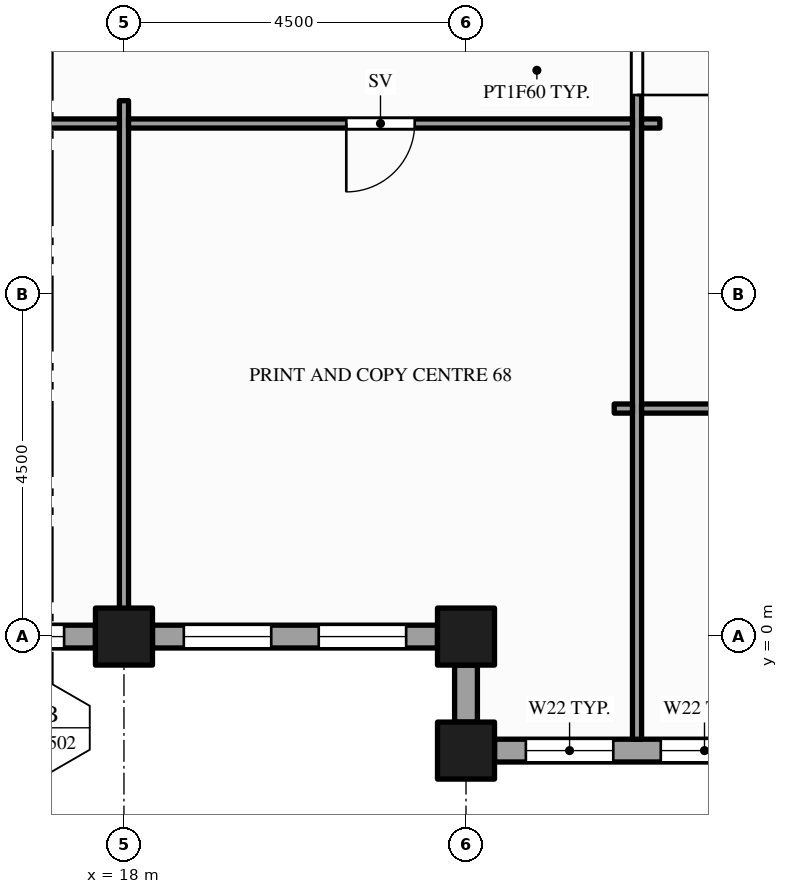
"""IFC4 building model, lengths in metres.
Left out: names, types, materials, properties, quantities, classifications, styles, units other than length and angle.
Written with IfcOpenShell. Run it as: python <this file> out.ifc"""

import sys

from ifc_helpers import new_model, si_unit, direction, frame, frame_2d, origin, origin_2d, place, context, subcontext, project, spatial, rectangle, hollow_rectangle, extrude, element, fill, save


model = new_model("IFC4")
c1 = context("Model", 3, precision=1e-05, world=origin(), true_north=direction((0.0, 1.0)))
c2 = subcontext(c1, "Body", "Model", "MODEL_VIEW")
j1 = project(units=[si_unit("LENGTHUNIT", "METRE"), si_unit("PLANEANGLEUNIT", "RADIAN")], contexts=[c1])
p1 = place(None, origin())
s1 = spatial("IfcSite", under=j1, at=p1, CompositionType="ELEMENT")
p2 = place(p1, origin())
s2 = spatial("IfcBuilding", under=s1, at=p2, CompositionType="ELEMENT")
p3 = place(p2, frame((0.0, 0.0, 223.0)))
s3 = spatial("IfcBuildingStorey", under=s2, at=p3, CompositionType="ELEMENT", Elevation=223.0)
for number, where, z_axis, x_axis in (
    (1, (18.0, 0.0, -0.15), (0.0, 0.0, 1.0), (1.0, 0.0, 0.0)),
    (2, (22.5, -1.5, -0.15), (0.0, 0.0, 1.0), (1.0, 0.0, 0.0)),
    (3, (22.5, 0.0, -0.15), (0.0, 0.0, 1.0), (1.0, 0.0, 0.0)),
):
    element("IfcColumn", number, at=place(p3, frame(where, z_axis=z_axis, x_axis=x_axis)), inside=s3, PredefinedType="COLUMN", context=c2, shape_type="SweptSolid", body=[
        extrude(hollow_rectangle(XDim=0.75, YDim=0.75, WallThickness=0.036, at=origin_2d()), origin(), (0.0, 0.0, 1.0), 4.0),
    ])
p4 = place(p3, frame((22.875, -1.5, 0.0), z_axis=(0.0, 0.0, 1.0), x_axis=(1.0, 0.0, 0.0)))
e4 = element("IfcWall", 4, at=p4, inside=s3, PredefinedType="STANDARD", context=c2, shape_type="SweptSolid", body=[
    extrude(rectangle(XDim=3.75, YDim=0.3, at=frame_2d((1.875, 0.0))), origin(), (0.0, 0.0, 1.0), 2.76),
])
p5 = place(p4, frame((0.413, 0.0, 0.9)))
e5 = element("IfcOpeningElement", 5, at=p5, cuts=e4, PredefinedType="OPENING", context=c2, shape_type="SweptSolid", body=[
    extrude(rectangle(XDim=1.15, YDim=1.5, at=frame_2d((0.575, 0.75))), frame((0.0, 0.16, 0.0), z_axis=(0.0, -1.0, 0.0), x_axis=(1.0, 0.0, 0.0)), (0.0, 0.0, 1.0), 0.32),
])
p6 = place(p4, frame((2.188, 0.0, 0.9)))
e6 = element("IfcOpeningElement", 6, at=p6, cuts=e4, PredefinedType="OPENING", context=c2, shape_type="SweptSolid", body=[
    extrude(rectangle(XDim=1.15, YDim=1.5, at=frame_2d((0.575, 0.75))), frame((0.0, 0.16, 0.0), z_axis=(0.0, -1.0, 0.0), x_axis=(1.0, 0.0, 0.0)), (0.0, 0.0, 1.0), 0.32),
])
p7 = place(p3, frame((13.875, 0.0, 0.0), z_axis=(0.0, 0.0, 1.0), x_axis=(1.0, 0.0, 0.0)))
e7 = element("IfcWall", 7, at=p7, inside=s3, PredefinedType="STANDARD", context=c2, shape_type="SweptSolid", body=[
    extrude(rectangle(XDim=3.75, YDim=0.3, at=frame_2d((1.875, 0.0))), origin(), (0.0, 0.0, 1.0), 2.87),
])
p8 = place(p7, frame((0.413, 0.0, 0.9)))
e8 = element("IfcOpeningElement", 8, at=p8, cuts=e7, PredefinedType="OPENING", context=c2, shape_type="SweptSolid", body=[
    extrude(rectangle(XDim=1.15, YDim=1.75, at=frame_2d((0.575, 0.875))), frame((0.0, 0.16, 0.0), z_axis=(0.0, -1.0, 0.0), x_axis=(1.0, 0.0, 0.0)), (0.0, 0.0, 1.0), 0.32),
])
p9 = place(p7, frame((2.188, 0.0, 0.9)))
e9 = element("IfcOpeningElement", 9, at=p9, cuts=e7, PredefinedType="OPENING", context=c2, shape_type="SweptSolid", body=[
    extrude(rectangle(XDim=1.15, YDim=1.75, at=frame_2d((0.575, 0.875))), frame((0.0, 0.16, 0.0), z_axis=(0.0, -1.0, 0.0), x_axis=(1.0, 0.0, 0.0)), (0.0, 0.0, 1.0), 0.32),
])
p10 = place(p3, frame((18.375, 0.0, 0.0), z_axis=(0.0, 0.0, 1.0), x_axis=(1.0, 0.0, 0.0)))
e10 = element("IfcWall", 10, at=p10, inside=s3, PredefinedType="STANDARD", context=c2, shape_type="SweptSolid", body=[
    extrude(rectangle(XDim=3.75, YDim=0.3, at=frame_2d((1.875, 0.0))), origin(), (0.0, 0.0, 1.0), 2.87),
])
p11 = place(p10, frame((0.413, 0.0, 0.9)))
e11 = element("IfcOpeningElement", 11, at=p11, cuts=e10, PredefinedType="OPENING", context=c2, shape_type="SweptSolid", body=[
    extrude(rectangle(XDim=1.15, YDim=1.75, at=frame_2d((0.575, 0.875))), frame((0.0, 0.16, 0.0), z_axis=(0.0, -1.0, 0.0), x_axis=(1.0, 0.0, 0.0)), (0.0, 0.0, 1.0), 0.32),
])
p12 = place(p10, frame((2.188, 0.0, 0.9)))
e12 = element("IfcOpeningElement", 12, at=p12, cuts=e10, PredefinedType="OPENING", context=c2, shape_type="SweptSolid", body=[
    extrude(rectangle(XDim=1.15, YDim=1.75, at=frame_2d((0.575, 0.875))), frame((0.0, 0.16, 0.0), z_axis=(0.0, -1.0, 0.0), x_axis=(1.0, 0.0, 0.0)), (0.0, 0.0, 1.0), 0.32),
])
p13 = place(p3, frame((22.5, -0.375, 0.0), z_axis=(0.0, 0.0, 1.0), x_axis=(0.0, -1.0, 0.0)))
e13 = element("IfcWall", 13, at=p13, inside=s3, PredefinedType="STANDARD", context=c2, shape_type="SweptSolid", body=[
    extrude(rectangle(XDim=0.75, YDim=0.3, at=frame_2d((0.375, 0.0))), origin(), (0.0, 0.0, 1.0), 3.157),
])
p14 = place(p3, frame((18.0, 0.15, 0.0), z_axis=(0.0, 0.0, 1.0), x_axis=(0.0, 1.0, 0.0)))
e14 = element("IfcWall", 14, at=p14, inside=s3, PredefinedType="PARTITIONING", context=c2, shape_type="SweptSolid", body=[
    extrude(rectangle(XDim=6.9, YDim=0.12, at=frame_2d((3.45, 0.0))), origin(), (0.0, 0.0, 1.0), 2.87),
])
p15 = place(p3, frame((24.75, -1.35, 0.0), z_axis=(0.0, 0.0, 1.0), x_axis=(0.0, 1.0, 0.0)))
e15 = element("IfcWall", 15, at=p15, inside=s3, PredefinedType="PARTITIONING", context=c2, shape_type="SweptSolid", body=[
    extrude(rectangle(XDim=24.101, YDim=0.12, at=frame_2d((12.05, 0.0))), origin(), (0.0, 0.0, 1.0), 2.76),
])
p16 = place(p15, frame((8.475, 0.0, 0.0)))
e16 = element("IfcOpeningElement", 16, at=p16, cuts=e15, PredefinedType="OPENING", context=c2, shape_type="SweptSolid", body=[
    extrude(rectangle(XDim=1.5, YDim=2.1, at=frame_2d((0.75, 1.05))), frame((0.0, 0.07, 0.0), z_axis=(0.0, -1.0, 0.0), x_axis=(1.0, 0.0, 0.0)), (0.0, 0.0, 1.0), 0.14),
])
p17 = place(p15, frame((13.5, 0.0, 0.0)))
e17 = element("IfcOpeningElement", 17, at=p17, cuts=e15, PredefinedType="OPENING", context=c2, shape_type="SweptSolid", body=[
    extrude(rectangle(XDim=1.2, YDim=2.1, at=frame_2d((0.6, 1.05))), frame((0.0, 0.07, 0.0), z_axis=(0.0, -1.0, 0.0), x_axis=(1.0, 0.0, 0.0)), (0.0, 0.0, 1.0), 0.14),
])
p18 = place(p3, frame((24.45, 3.0, 0.0), z_axis=(0.0, 0.0, 1.0), x_axis=(1.0, 0.0, 0.0)))
e18 = element("IfcWall", 18, at=p18, inside=s3, PredefinedType="PARTITIONING", context=c2, shape_type="SweptSolid", body=[
    extrude(rectangle(XDim=0.24, YDim=0.12, at=frame_2d((0.12, 0.0))), origin(), (0.0, 0.0, 1.0), 2.76),
])
p19 = place(p3, frame((24.81, 3.0, 0.0), z_axis=(0.0, 0.0, 1.0), x_axis=(1.0, 0.0, 0.0)))
e19 = element("IfcWall", 19, at=p19, inside=s3, PredefinedType="PARTITIONING", context=c2, shape_type="SweptSolid", body=[
    extrude(rectangle(XDim=2.13, YDim=0.12, at=frame_2d((1.065, 0.0))), origin(), (0.0, 0.0, 1.0), 2.76),
])
p20 = place(p3, frame((11.31, 6.75, 0.0), z_axis=(0.0, 0.0, 1.0), x_axis=(1.0, 0.0, 0.0)))
e20 = element("IfcWall", 20, at=p20, inside=s3, PredefinedType="PARTITIONING", context=c2, shape_type="SweptSolid", body=[
    extrude(rectangle(XDim=6.63, YDim=0.12, at=frame_2d((3.315, 0.0))), origin(), (0.0, 0.0, 1.0), 2.87),
])
p21 = place(p20, frame((2.815, 0.0, 0.0)))
e21 = element("IfcOpeningElement", 21, at=p21, cuts=e20, PredefinedType="OPENING", context=c2, shape_type="SweptSolid", body=[
    extrude(rectangle(XDim=1.0, YDim=2.1, at=frame_2d((0.5, 1.05))), frame((0.0, 0.07, 0.0), z_axis=(0.0, -1.0, 0.0), x_axis=(1.0, 0.0, 0.0)), (0.0, 0.0, 1.0), 0.14),
])
p22 = place(p3, frame((18.06, 6.75, 0.0), z_axis=(0.0, 0.0, 1.0), x_axis=(1.0, 0.0, 0.0)))
e22 = element("IfcWall", 22, at=p22, inside=s3, PredefinedType="PARTITIONING", context=c2, shape_type="SweptSolid", body=[
    extrude(rectangle(XDim=6.63, YDim=0.12, at=frame_2d((3.315, 0.0))), origin(), (0.0, 0.0, 1.0), 2.76),
])
p23 = place(p22, frame((2.865, 0.0, 0.0)))
e23 = element("IfcOpeningElement", 23, at=p23, cuts=e22, PredefinedType="OPENING", context=c2, shape_type="SweptSolid", body=[
    extrude(rectangle(XDim=0.9, YDim=2.1, at=frame_2d((0.45, 1.05))), frame((0.0, 0.07, 0.0), z_axis=(0.0, -1.0, 0.0), x_axis=(1.0, 0.0, 0.0)), (0.0, 0.0, 1.0), 0.14),
])
p24 = place(p3, frame((24.81, 6.75, 0.0), z_axis=(0.0, 0.0, 1.0), x_axis=(1.0, 0.0, 0.0)))
e24 = element("IfcWall", 24, at=p24, inside=s3, PredefinedType="PARTITIONING", context=c2, shape_type="SweptSolid", body=[
    extrude(rectangle(XDim=0.24, YDim=0.12, at=frame_2d((0.12, 0.0))), origin(), (0.0, 0.0, 1.0), 2.76),
])
p25 = place(p5, origin())
e25 = element("IfcWindow", 25, at=p25, inside=s3, PartitioningType="SINGLE_PANEL", PredefinedType="WINDOW", context=c2, shape_type="SweptSolid", body=[
    extrude(rectangle(XDim=1.15, YDim=1.5, at=frame_2d((0.575, 0.75))), frame((0.0, 0.03, 0.0), z_axis=(0.0, -1.0, 0.0), x_axis=(1.0, 0.0, 0.0)), (0.0, 0.0, 1.0), 0.06),
])
fill(e5, e25)
p26 = place(p6, origin())
e26 = element("IfcWindow", 26, at=p26, inside=s3, PartitioningType="SINGLE_PANEL", PredefinedType="WINDOW", context=c2, shape_type="SweptSolid", body=[
    extrude(rectangle(XDim=1.15, YDim=1.5, at=frame_2d((0.575, 0.75))), frame((0.0, 0.03, 0.0), z_axis=(0.0, -1.0, 0.0), x_axis=(1.0, 0.0, 0.0)), (0.0, 0.0, 1.0), 0.06),
])
fill(e6, e26)
p27 = place(p9, origin())
e27 = element("IfcWindow", 27, at=p27, inside=s3, PartitioningType="SINGLE_PANEL", PredefinedType="WINDOW", context=c2, shape_type="SweptSolid", body=[
    extrude(rectangle(XDim=1.15, YDim=1.75, at=frame_2d((0.575, 0.875))), frame((0.0, 0.03, 0.0), z_axis=(0.0, -1.0, 0.0), x_axis=(1.0, 0.0, 0.0)), (0.0, 0.0, 1.0), 0.06),
])
fill(e9, e27)
p28 = place(p11, origin())
e28 = element("IfcWindow", 28, at=p28, inside=s3, PartitioningType="SINGLE_PANEL", PredefinedType="WINDOW", context=c2, shape_type="SweptSolid", body=[
    extrude(rectangle(XDim=1.15, YDim=1.75, at=frame_2d((0.575, 0.875))), frame((0.0, 0.03, 0.0), z_axis=(0.0, -1.0, 0.0), x_axis=(1.0, 0.0, 0.0)), (0.0, 0.0, 1.0), 0.06),
])
fill(e11, e28)
p29 = place(p12, origin())
e29 = element("IfcWindow", 29, at=p29, inside=s3, PartitioningType="SINGLE_PANEL", PredefinedType="WINDOW", context=c2, shape_type="SweptSolid", body=[
    extrude(rectangle(XDim=1.15, YDim=1.75, at=frame_2d((0.575, 0.875))), frame((0.0, 0.03, 0.0), z_axis=(0.0, -1.0, 0.0), x_axis=(1.0, 0.0, 0.0)), (0.0, 0.0, 1.0), 0.06),
])
fill(e12, e29)
p30 = place(p16, origin())
e30 = element("IfcDoor", 30, at=p30, inside=s3, OperationType="SINGLE_SWING_LEFT", PredefinedType="DOOR", context=c2, shape_type="SweptSolid", body=[
    extrude(rectangle(XDim=1.5, YDim=2.1, at=frame_2d((0.75, 1.05))), frame((0.0, 0.025, 0.0), z_axis=(0.0, -1.0, 0.0), x_axis=(1.0, 0.0, 0.0)), (0.0, 0.0, 1.0), 0.05),
])
fill(e16, e30)
p31 = place(p23, origin())
e31 = element("IfcDoor", 31, at=p31, inside=s3, OperationType="SINGLE_SWING_LEFT", PredefinedType="DOOR", context=c2, shape_type="SweptSolid", body=[
    extrude(rectangle(XDim=0.9, YDim=2.1, at=frame_2d((0.45, 1.05))), frame((0.0, 0.025, 0.0), z_axis=(0.0, -1.0, 0.0), x_axis=(1.0, 0.0, 0.0)), (0.0, 0.0, 1.0), 0.05),
])
fill(e23, e31)
save(model, sys.argv[1])
